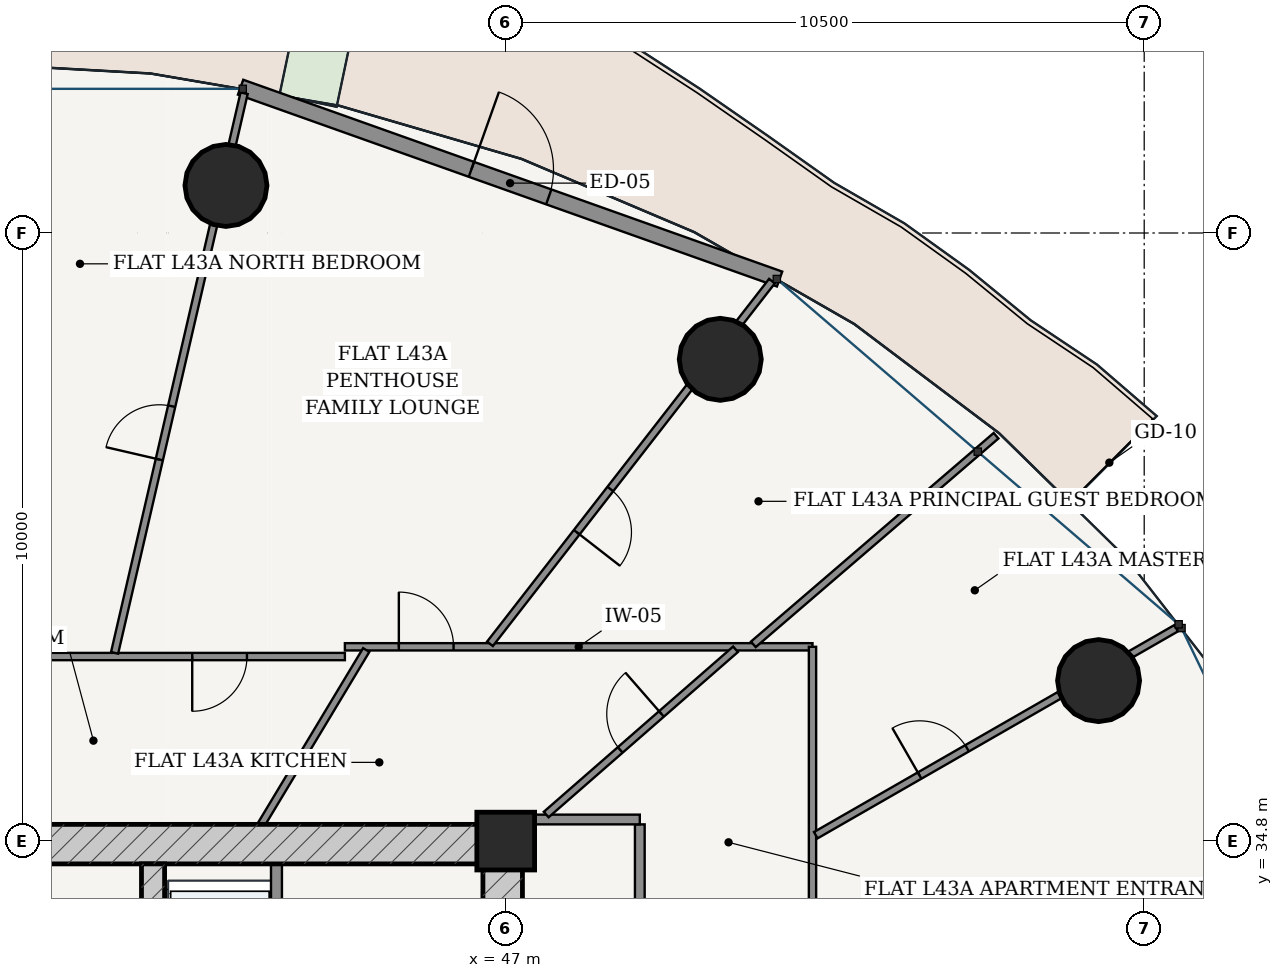
"""IFC4 building model, lengths in metres.
Left out: names, types, materials, properties, quantities, classifications, styles, units other than length and angle.
Written with IfcOpenShell. Run it as: python <this file> out.ifc"""

import sys

from ifc_helpers import new_model, si_unit, direction, frame, frame_2d, origin, origin_2d, place, context, subcontext, project, spatial, rectangle, hollow_circle, extrude, source, transform, mapped, element, fill, save


model = new_model("IFC4")
c1 = context("Model", 3, precision=1e-05, world=origin(), true_north=direction((-0.2419218956, 0.970295726276)))
c2 = subcontext(c1, "Body", "Model", "MODEL_VIEW")
j1 = project(units=[si_unit("LENGTHUNIT", "METRE"), si_unit("PLANEANGLEUNIT", "RADIAN")], contexts=[c1])
p1 = place(None, origin())
s1 = spatial("IfcSite", under=j1, at=p1, CompositionType="ELEMENT")
p2 = place(p1, origin())
s2 = spatial("IfcBuilding", under=s1, at=p2, CompositionType="ELEMENT")
p3 = place(p2, frame((0.0, 0.0, 164.2)))
s3 = spatial("IfcBuildingStorey", under=s2, at=p3, CompositionType="ELEMENT", Elevation=164.2)
p4 = place(p3, frame((47.0, 34.8, 0.0), z_axis=(0.0, 0.0, 1.0), x_axis=(1.0, 0.0, 0.0)))
e1 = element("IfcColumn", 1, at=p4, inside=s3, PredefinedType="COLUMN", context=c2, shape_type="SweptSolid", body=[
    extrude(rectangle(XDim=0.95, YDim=0.95, at=origin_2d()), origin(), (0.0, 0.0, 1.0), 3.6),
])
p5 = place(p3, frame((28.725, 34.75, 0.0), z_axis=(0.0, 0.0, 1.0), x_axis=(1.0, 0.0, 0.0)))
e2 = element("IfcWall", 2, at=p5, inside=s3, PredefinedType="SHEAR", context=c2, shape_type="SweptSolid", body=[
    extrude(rectangle(XDim=18.55, YDim=0.65, at=frame_2d((9.275, 0.0))), origin(), (0.0, 0.0, 1.0), 3.33),
])
p6 = place(p3, frame((46.95, 19.175, 0.0), z_axis=(0.0, 0.0, 1.0), x_axis=(0.0, 1.0, 0.0)))
e3 = element("IfcWall", 3, at=p6, inside=s3, PredefinedType="SHEAR", context=c2, shape_type="SweptSolid", body=[
    extrude(rectangle(XDim=15.25, YDim=0.65, at=frame_2d((7.625, 0.0))), origin(), (0.0, 0.0, 1.0), 3.33),
])
p7 = place(p6, frame((9.875, 0.0, 0.0)))
e4 = element("IfcOpeningElement", 4, at=p7, cuts=e3, PredefinedType="OPENING", context=c2, shape_type="SweptSolid", body=[
    extrude(rectangle(XDim=1.5, YDim=2.2, at=frame_2d((0.75, 1.1))), frame((0.0, 0.335, 0.0), z_axis=(0.0, -1.0, 0.0), x_axis=(1.0, 0.0, 0.0)), (0.0, 0.0, 1.0), 0.67),
])
p8 = place(p3, frame((41.2, 19.175, 0.0), z_axis=(0.0, 0.0, 1.0), x_axis=(0.0, 1.0, 0.0)))
e5 = element("IfcWall", 5, at=p8, inside=s3, PredefinedType="SHEAR", context=c2, shape_type="SweptSolid", body=[
    extrude(rectangle(XDim=15.25, YDim=0.38, at=frame_2d((7.625, 0.0))), origin(), (0.0, 0.0, 1.0), 3.33),
])
p9 = place(p8, frame((7.8, 0.0, 0.0)))
e6 = element("IfcOpeningElement", 6, at=p9, cuts=e5, PredefinedType="OPENING", context=c2, shape_type="SweptSolid", body=[
    extrude(rectangle(XDim=1.05, YDim=2.15, at=frame_2d((0.525, 1.075))), frame((0.0, 0.2, 0.0), z_axis=(0.0, -1.0, 0.0), x_axis=(1.0, 0.0, 0.0)), (0.0, 0.0, 1.0), 0.4),
])
for number, where, z_axis, x_axis in (
    (7, (56.75, 37.439, 0.0), (0.0, 0.0, 1.0), (1.0, 0.0, 0.0)),
    (8, (50.528, 42.723, 0.0), (0.0, 0.0, 1.0), (1.0, 0.0, 0.0)),
    (9, (42.399, 45.582, 0.0), (0.0, 0.0, 1.0), (1.0, 0.0, 0.0)),
):
    element("IfcColumn", number, at=place(p3, frame(where, z_axis=z_axis, x_axis=x_axis)), inside=s3, PredefinedType="COLUMN", context=c2, shape_type="SweptSolid", body=[
        extrude(hollow_circle(Radius=0.675, WallThickness=0.042, at=origin_2d()), origin(), (0.0, 0.0, 1.0), 3.6),
    ])
p10 = place(p3, frame((51.503, 44.043, 0.0), z_axis=(0.0, 0.0, 1.0), x_axis=(-0.942095406405, 0.335344964522, 0.0)))
e10 = element("IfcWall", 10, at=p10, inside=s3, PredefinedType="SOLIDWALL", context=c2, shape_type="SweptSolid", body=[
    extrude(rectangle(XDim=9.408, YDim=0.26, at=frame_2d((4.704, 0.0))), origin(), (0.0, 0.0, 1.0), 3.33),
])
p11 = place(p10, frame((4.029, 0.0, 0.0)))
e11 = element("IfcOpeningElement", 11, at=p11, cuts=e10, PredefinedType="OPENING", context=c2, shape_type="SweptSolid", body=[
    extrude(rectangle(XDim=1.35, YDim=2.2, at=frame_2d((0.675, 1.1))), frame((0.0, 0.14, 0.0), z_axis=(0.0, -1.0, 0.0), x_axis=(1.0, 0.0, 0.0)), (0.0, 0.0, 1.0), 0.28),
])
p12 = place(p3, frame((43.23, 28.52, 0.0), z_axis=(0.0, 0.0, 1.0), x_axis=(0.0, 1.0, 0.0)))
e12 = element("IfcWall", 12, at=p12, inside=s3, PredefinedType="PARTITIONING", context=c2, shape_type="SweptSolid", body=[
    extrude(rectangle(XDim=5.905, YDim=0.18, at=frame_2d((2.953, 0.0))), origin(), (0.0, 0.0, 1.0), 3.33),
])
p13 = place(p12, frame((0.905, 0.0, 0.0)))
e13 = element("IfcOpeningElement", 13, at=p13, cuts=e12, PredefinedType="OPENING", context=c2, shape_type="SweptSolid", body=[
    extrude(rectangle(XDim=0.85, YDim=2.1, at=frame_2d((0.425, 1.05))), frame((0.0, 0.1, 0.0), z_axis=(0.0, -1.0, 0.0), x_axis=(1.0, 0.0, 0.0)), (0.0, 0.0, 1.0), 0.2),
])
p14 = place(p12, frame((3.655, 0.0, 0.0)))
e14 = element("IfcOpeningElement", 14, at=p14, cuts=e12, PredefinedType="OPENING", context=c2, shape_type="SweptSolid", body=[
    extrude(rectangle(XDim=1.15, YDim=2.2, at=frame_2d((0.575, 1.1))), frame((0.0, 0.1, 0.0), z_axis=(0.0, -1.0, 0.0), x_axis=(1.0, 0.0, 0.0)), (0.0, 0.0, 1.0), 0.2),
])
p15 = place(p3, frame((49.205, 16.675, 0.0), z_axis=(0.0, 0.0, 1.0), x_axis=(0.0, 1.0, 0.0)))
e15 = element("IfcWall", 15, at=p15, inside=s3, PredefinedType="PARTITIONING", context=c2, shape_type="SweptSolid", body=[
    extrude(rectangle(XDim=18.4, YDim=0.16, at=frame_2d((9.2, 0.0))), origin(), (0.0, 0.0, 1.0), 2.776),
])
p16 = place(p15, frame((15.326, 0.0, 0.0)))
e16 = element("IfcOpeningElement", 16, at=p16, cuts=e15, PredefinedType="OPENING", context=c2, shape_type="SweptSolid", body=[
    extrude(rectangle(XDim=0.98, YDim=2.2, at=frame_2d((0.49, 1.1))), frame((0.0, 0.09, 0.0), z_axis=(0.0, -1.0, 0.0), x_axis=(1.0, 0.0, 0.0)), (0.0, 0.0, 1.0), 0.18),
])
p17 = place(p3, frame((47.275, 35.155, 0.0), z_axis=(0.0, 0.0, 1.0), x_axis=(1.0, 0.0, 0.0)))
e17 = element("IfcWall", 17, at=p17, inside=s3, PredefinedType="PARTITIONING", context=c2, shape_type="SweptSolid", body=[
    extrude(rectangle(XDim=1.93, YDim=0.16, at=frame_2d((0.965, 0.0))), origin(), (0.0, 0.0, 1.0), 2.776),
])
p18 = place(p3, frame((38.102, 37.835, 0.0), z_axis=(0.0, 0.0, 1.0), x_axis=(1.0, 0.0, 0.0)))
e18 = element("IfcWall", 18, at=p18, inside=s3, PredefinedType="PARTITIONING", context=c2, shape_type="SweptSolid", body=[
    extrude(rectangle(XDim=6.253, YDim=0.12, at=frame_2d((3.126, 0.0))), origin(), (0.0, 0.0, 1.0), 2.776),
])
p19 = place(p18, frame((3.742, 0.0, 0.0)))
e19 = element("IfcOpeningElement", 19, at=p19, cuts=e18, PredefinedType="OPENING", context=c2, shape_type="SweptSolid", body=[
    extrude(rectangle(XDim=0.9, YDim=2.15, at=frame_2d((0.45, 1.075))), frame((0.0, 0.07, 0.0), z_axis=(0.0, -1.0, 0.0), x_axis=(1.0, 0.0, 0.0)), (0.0, 0.0, 1.0), 0.14),
])
p20 = place(p3, frame((44.355, 37.995, 0.0), z_axis=(0.0, 0.0, 1.0), x_axis=(1.0, 0.0, 0.0)))
e20 = element("IfcWall", 20, at=p20, inside=s3, PredefinedType="PARTITIONING", context=c2, shape_type="SweptSolid", body=[
    extrude(rectangle(XDim=7.69, YDim=0.12, at=frame_2d((3.845, 0.0))), origin(), (0.0, 0.0, 1.0), 2.776),
])
p21 = place(p20, frame((0.887, 0.0, 0.0)))
e21 = element("IfcOpeningElement", 21, at=p21, cuts=e20, PredefinedType="OPENING", context=c2, shape_type="SweptSolid", body=[
    extrude(rectangle(XDim=0.9, YDim=2.15, at=frame_2d((0.45, 1.075))), frame((0.0, 0.07, 0.0), z_axis=(0.0, -1.0, 0.0), x_axis=(1.0, 0.0, 0.0)), (0.0, 0.0, 1.0), 0.14),
])
p22 = place(p3, frame((52.045, 37.995, 0.0), z_axis=(0.0, 0.0, 1.0), x_axis=(0.0, -1.0, 0.0)))
e22 = element("IfcWall", 22, at=p22, inside=s3, PredefinedType="PARTITIONING", context=c2, shape_type="SweptSolid", body=[
    extrude(rectangle(XDim=11.093, YDim=0.12, at=frame_2d((5.546, 0.0))), origin(), (0.0, 0.0, 1.0), 2.776),
])
p23 = place(p22, frame((4.638, 0.0, 0.0)))
e23 = element("IfcOpeningElement", 23, at=p23, cuts=e22, PredefinedType="OPENING", context=c2, shape_type="SweptSolid", body=[
    extrude(rectangle(XDim=0.9, YDim=2.15, at=frame_2d((0.45, 1.075))), frame((0.0, 0.07, 0.0), z_axis=(0.0, -1.0, 0.0), x_axis=(1.0, 0.0, 0.0)), (0.0, 0.0, 1.0), 0.14),
])
p24 = place(p3, frame((52.099, 34.897, 0.0), z_axis=(0.0, 0.0, 1.0), x_axis=(0.867170536447, 0.498011305813, 0.0)))
e24 = element("IfcWall", 24, at=p24, inside=s3, PredefinedType="PARTITIONING", context=c2, shape_type="SweptSolid", body=[
    extrude(rectangle(XDim=6.834, YDim=0.12, at=frame_2d((3.417, 0.0))), origin(), (0.0, 0.0, 1.0), 2.776),
])
p25 = place(p24, frame((1.969, 0.0, 0.0)))
e25 = element("IfcOpeningElement", 25, at=p25, cuts=e24, PredefinedType="OPENING", context=c2, shape_type="SweptSolid", body=[
    extrude(rectangle(XDim=0.9, YDim=2.15, at=frame_2d((0.45, 1.075))), frame((0.0, 0.07, 0.0), z_axis=(0.0, -1.0, 0.0), x_axis=(1.0, 0.0, 0.0)), (0.0, 0.0, 1.0), 0.14),
])
p26 = place(p3, frame((51.072, 38.035, 0.0), z_axis=(0.0, 0.0, 1.0), x_axis=(0.758368609512, 0.65182593697, 0.0)))
e26 = element("IfcWall", 26, at=p26, inside=s3, PredefinedType="PARTITIONING", context=c2, shape_type="SweptSolid", body=[
    extrude(rectangle(XDim=5.263, YDim=0.12, at=frame_2d((2.632, 0.0))), origin(), (0.0, 0.0, 1.0), 2.846),
])
p27 = place(p3, frame((46.741, 38.044, 0.0), z_axis=(0.0, 0.0, 1.0), x_axis=(0.613770587295, 0.789484430607, 0.0)))
e27 = element("IfcWall", 27, at=p27, inside=s3, PredefinedType="PARTITIONING", context=c2, shape_type="SweptSolid", body=[
    extrude(rectangle(XDim=7.556, YDim=0.12, at=frame_2d((3.778, 0.0))), origin(), (0.0, 0.0, 1.0), 2.776),
])
p28 = place(p27, frame((2.325, 0.0, 0.0)))
e28 = element("IfcOpeningElement", 28, at=p28, cuts=e27, PredefinedType="OPENING", context=c2, shape_type="SweptSolid", body=[
    extrude(rectangle(XDim=0.9, YDim=2.15, at=frame_2d((0.45, 1.075))), frame((0.0, 0.07, 0.0), z_axis=(0.0, -1.0, 0.0), x_axis=(1.0, 0.0, 0.0)), (0.0, 0.0, 1.0), 0.14),
])
p29 = place(p3, frame((40.568, 37.896, 0.0), z_axis=(0.0, 0.0, 1.0), x_axis=(0.225452174141, 0.974254236416, 0.0)))
e29 = element("IfcWall", 29, at=p29, inside=s3, PredefinedType="PARTITIONING", context=c2, shape_type="SweptSolid", body=[
    extrude(rectangle(XDim=9.446, YDim=0.12, at=frame_2d((4.723, 0.0))), origin(), (0.0, 0.0, 1.0), 2.776),
])
p30 = place(p29, frame((3.264, 0.0, 0.0)))
e30 = element("IfcOpeningElement", 30, at=p30, cuts=e29, PredefinedType="OPENING", context=c2, shape_type="SweptSolid", body=[
    extrude(rectangle(XDim=0.9, YDim=2.15, at=frame_2d((0.45, 1.075))), frame((0.0, 0.07, 0.0), z_axis=(0.0, -1.0, 0.0), x_axis=(1.0, 0.0, 0.0)), (0.0, 0.0, 1.0), 0.14),
])
p31 = place(p3, frame((47.665, 35.236, 0.0), z_axis=(0.0, 0.0, 1.0), x_axis=(0.753384754287, 0.657579966246, 0.0)))
e31 = element("IfcWall", 31, at=p31, inside=s3, PredefinedType="PARTITIONING", context=c2, shape_type="SweptSolid", body=[
    extrude(rectangle(XDim=4.133, YDim=0.12, at=frame_2d((2.067, 0.0))), origin(), (0.0, 0.0, 1.0), 3.005),
])
p32 = place(p31, frame((1.617, 0.0, 0.0)))
e32 = element("IfcOpeningElement", 32, at=p32, cuts=e31, PredefinedType="OPENING", context=c2, shape_type="SweptSolid", body=[
    extrude(rectangle(XDim=0.9, YDim=2.15, at=frame_2d((0.45, 1.075))), frame((0.0, 0.07, 0.0), z_axis=(0.0, -1.0, 0.0), x_axis=(1.0, 0.0, 0.0)), (0.0, 0.0, 1.0), 0.14),
])
p33 = place(p3, frame((42.98, 35.075, 0.0), z_axis=(0.0, 0.0, 1.0), x_axis=(0.515686235332, 0.856777512946, 0.0)))
e33 = element("IfcWall", 33, at=p33, inside=s3, PredefinedType="PARTITIONING", context=c2, shape_type="SweptSolid", body=[
    extrude(rectangle(XDim=3.346, YDim=0.12, at=frame_2d((1.673, 0.0))), origin(), (0.0, 0.0, 1.0), 3.33),
])
m1 = source(origin(), c2, "Body", "SweptSolid", [
    extrude(rectangle(XDim=1.35, YDim=2.2, at=frame_2d((0.675, 1.1))), frame((0.0, 0.025, 0.0), z_axis=(0.0, -1.0, 0.0), x_axis=(1.0, 0.0, 0.0)), (0.0, 0.0, 1.0), 0.05),
])
p34 = place(p11, frame((1.35, 0.0, 0.0), z_axis=(0.0, 0.0, 1.0), x_axis=(-1.0, 0.0, 0.0)))
e34 = element("IfcDoor", 34, at=p34, inside=s3, OperationType="SINGLE_SWING_LEFT", PredefinedType="DOOR", context=c2, shape_type="MappedRepresentation", body=[
    mapped(m1, transform((0.0, 0.0, 0.0), scale=1.0)),
])
fill(e11, e34)
m2 = source(origin(), c2, "Body", "SweptSolid", [
    extrude(rectangle(XDim=0.9, YDim=2.15, at=frame_2d((0.45, 1.075))), frame((0.0, 0.025, 0.0), z_axis=(0.0, -1.0, 0.0), x_axis=(1.0, 0.0, 0.0)), (0.0, 0.0, 1.0), 0.05),
])
p35 = place(p32, origin())
e35 = element("IfcDoor", 35, at=p35, inside=s3, OperationType="SINGLE_SWING_RIGHT", PredefinedType="DOOR", context=c2, shape_type="MappedRepresentation", body=[
    mapped(m2, transform((0.0, 0.0, 0.0), scale=1.0)),
])
fill(e32, e35)
p36 = place(p21, origin())
e36 = element("IfcDoor", 36, at=p36, inside=s3, OperationType="SINGLE_SWING_LEFT", PredefinedType="DOOR", context=c2, shape_type="MappedRepresentation", body=[
    mapped(m2, transform((0.0, 0.0, 0.0), scale=1.0)),
])
fill(e21, e36)
p37 = place(p19, frame((0.9, 0.0, 0.0), z_axis=(0.0, 0.0, 1.0), x_axis=(-1.0, 0.0, 0.0)))
e37 = element("IfcDoor", 37, at=p37, inside=s3, OperationType="SINGLE_SWING_RIGHT", PredefinedType="DOOR", context=c2, shape_type="MappedRepresentation", body=[
    mapped(m2, transform((0.0, 0.0, 0.0), scale=1.0)),
])
fill(e19, e37)
p38 = place(p25, origin())
e38 = element("IfcDoor", 38, at=p38, inside=s3, OperationType="SINGLE_SWING_LEFT", PredefinedType="DOOR", context=c2, shape_type="MappedRepresentation", body=[
    mapped(m2, transform((0.0, 0.0, 0.0), scale=1.0)),
])
fill(e25, e38)
p39 = place(p28, frame((0.9, 0.0, 0.0), z_axis=(0.0, 0.0, 1.0), x_axis=(-1.0, 0.0, 0.0)))
e39 = element("IfcDoor", 39, at=p39, inside=s3, OperationType="SINGLE_SWING_RIGHT", PredefinedType="DOOR", context=c2, shape_type="MappedRepresentation", body=[
    mapped(m2, transform((0.0, 0.0, 0.0), scale=1.0)),
])
fill(e28, e39)
p40 = place(p30, origin())
e40 = element("IfcDoor", 40, at=p40, inside=s3, OperationType="SINGLE_SWING_LEFT", PredefinedType="DOOR", context=c2, shape_type="MappedRepresentation", body=[
    mapped(m2, transform((0.0, 0.0, 0.0), scale=1.0)),
])
fill(e30, e40)
save(model, sys.argv[1])
